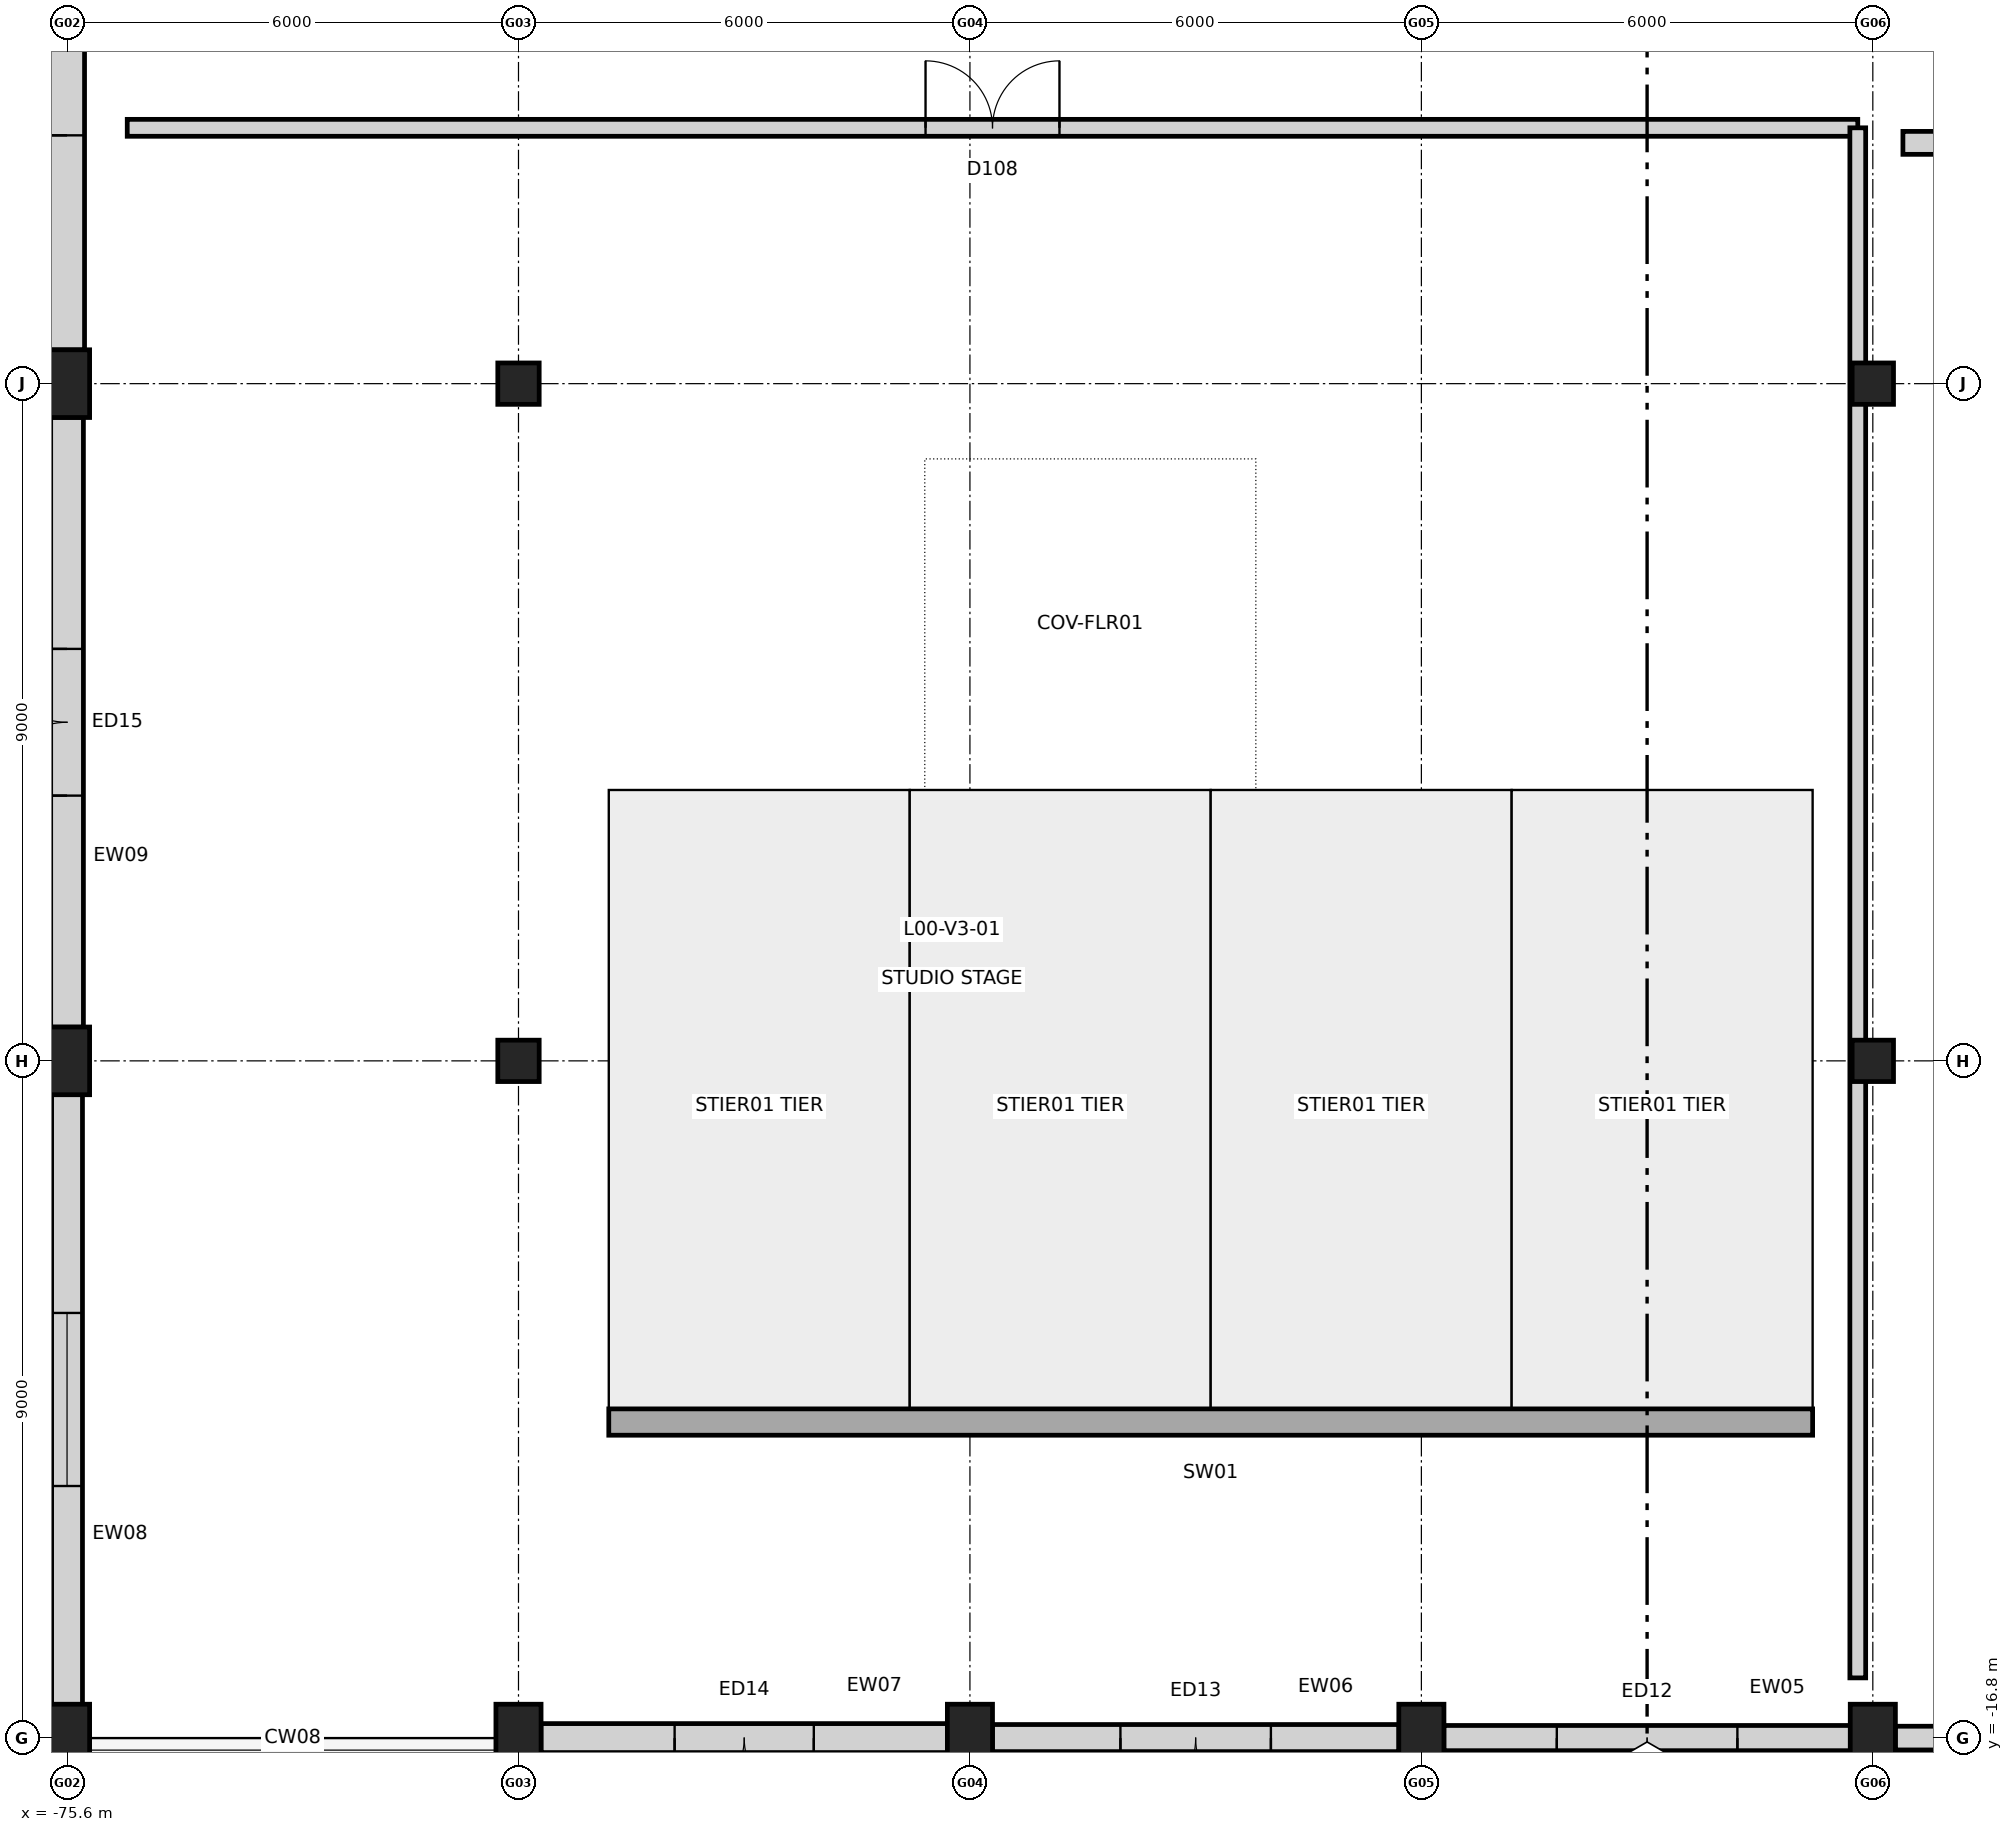
"""IFC4 building model, lengths in metres.
Left out: names, types, materials, properties, quantities, classifications, styles, units other than length and angle.
Written with IfcOpenShell. Run it as: python <this file> out.ifc"""

import sys

from ifc_helpers import new_model, si_unit, direction, frame, frame_2d, origin, origin_2d, place, context, subcontext, project, spatial, rectangle, extrude, element, fill, save


model = new_model("IFC4")
c1 = context("Model", 3, precision=1e-05, world=origin(), true_north=direction((0.0, 1.0)))
c2 = subcontext(c1, "Body", "Model", "MODEL_VIEW")
j1 = project(units=[si_unit("LENGTHUNIT", "METRE"), si_unit("PLANEANGLEUNIT", "RADIAN")], contexts=[c1])
p1 = place(None, origin())
s1 = spatial("IfcSite", under=j1, at=p1, CompositionType="ELEMENT")
p2 = place(p1, origin())
s2 = spatial("IfcBuilding", under=s1, at=p2, CompositionType="ELEMENT")
p3 = place(p2, origin())
s3 = spatial("IfcBuildingStorey", under=s2, at=p3, CompositionType="ELEMENT", Elevation=0.0)
for number, where, z_axis, x_axis in (
    (1, (-75.6, -16.8, 0.0), (0.0, 0.0, 1.0), (1.0, 0.0, 0.0)),
    (2, (-75.6, -7.8, 0.0), (0.0, 0.0, 1.0), (1.0, 0.0, 0.0)),
    (3, (-75.6, 1.2, 0.0), (0.0, 0.0, 1.0), (1.0, 0.0, 0.0)),
    (4, (-69.6, -16.8, 0.0), (0.0, 0.0, 1.0), (1.0, 0.0, 0.0)),
):
    element("IfcColumn", number, at=place(p3, frame(where, z_axis=z_axis, x_axis=x_axis)), inside=s3, PredefinedType="COLUMN", context=c2, shape_type="SweptSolid", body=[
        extrude(rectangle(XDim=0.6, YDim=0.9, at=origin_2d()), origin(), (0.0, 0.0, 1.0), 5.4),
    ])
for number, where, z_axis, x_axis in (
    (5, (-69.6, -7.8, 0.0), (0.0, 0.0, 1.0), (1.0, 0.0, 0.0)),
    (6, (-69.6, 1.2, 0.0), (0.0, 0.0, 1.0), (1.0, 0.0, 0.0)),
):
    element("IfcColumn", number, at=place(p3, frame(where, z_axis=z_axis, x_axis=x_axis)), inside=s3, PredefinedType="COLUMN", context=c2, shape_type="SweptSolid", body=[
        extrude(rectangle(XDim=0.55, YDim=0.55, at=origin_2d()), origin(), (0.0, 0.0, 1.0), 5.4),
    ])
for number, where, z_axis, x_axis in (
    (7, (-63.6, -16.8, 0.0), (0.0, 0.0, 1.0), (1.0, 0.0, 0.0)),
    (8, (-57.6, -16.8, 0.0), (0.0, 0.0, 1.0), (1.0, 0.0, 0.0)),
    (9, (-51.6, -16.8, 0.0), (0.0, 0.0, 1.0), (1.0, 0.0, 0.0)),
):
    element("IfcColumn", number, at=place(p3, frame(where, z_axis=z_axis, x_axis=x_axis)), inside=s3, PredefinedType="COLUMN", context=c2, shape_type="SweptSolid", body=[
        extrude(rectangle(XDim=0.6, YDim=0.9, at=origin_2d()), origin(), (0.0, 0.0, 1.0), 5.4),
    ])
for number, where, z_axis, x_axis in (
    (10, (-51.6, -7.8, 0.0), (0.0, 0.0, 1.0), (1.0, 0.0, 0.0)),
    (11, (-51.6, 1.2, 0.0), (0.0, 0.0, 1.0), (1.0, 0.0, 0.0)),
):
    element("IfcColumn", number, at=place(p3, frame(where, z_axis=z_axis, x_axis=x_axis)), inside=s3, PredefinedType="COLUMN", context=c2, shape_type="SweptSolid", body=[
        extrude(rectangle(XDim=0.55, YDim=0.55, at=origin_2d()), origin(), (0.0, 0.0, 1.0), 5.4),
    ])
p4 = place(p3, frame((-68.4, -12.6, 0.0), z_axis=(0.0, 0.0, 1.0), x_axis=(1.0, 0.0, 0.0)))
e12 = element("IfcWall", 12, at=p4, inside=s3, PredefinedType="SHEAR", context=c2, shape_type="SweptSolid", body=[
    extrude(rectangle(XDim=16.0, YDim=0.35, at=frame_2d((8.0, 0.0))), origin(), (0.0, 0.0, 1.0), 1.66),
])
p5 = place(p3, frame((-45.898, -16.8, 0.0), z_axis=(0.0, 0.0, 1.0), x_axis=(-1.0, 0.0, 0.0)))
e13 = element("IfcWall", 13, at=p5, inside=s3, PredefinedType="STANDARD", context=c2, shape_type="SweptSolid", body=[
    extrude(rectangle(XDim=5.404, YDim=0.315, at=frame_2d((2.702, 0.0))), origin(), (0.0, 0.0, 1.0), 4.32),
])
p6 = place(p5, frame((1.727, 0.0, 0.0)))
e14 = element("IfcOpeningElement", 14, at=p6, cuts=e13, PredefinedType="OPENING", context=c2, shape_type="SweptSolid", body=[
    extrude(rectangle(XDim=1.95, YDim=2.35, at=frame_2d((0.975, 1.175))), frame((0.0, 0.167, 0.0), z_axis=(0.0, -1.0, 0.0), x_axis=(1.0, 0.0, 0.0)), (0.0, 0.0, 1.0), 0.335),
])
p7 = place(p3, frame((-51.898, -16.8, 0.0), z_axis=(0.0, 0.0, 1.0), x_axis=(-1.0, 0.0, 0.0)))
e15 = element("IfcWall", 15, at=p7, inside=s3, PredefinedType="STANDARD", context=c2, shape_type="SweptSolid", body=[
    extrude(rectangle(XDim=5.404, YDim=0.335, at=frame_2d((2.702, 0.0))), origin(), (0.0, 0.0, 1.0), 4.32),
])
p8 = place(p7, frame((1.502, 0.0, 0.0)))
e16 = element("IfcOpeningElement", 16, at=p8, cuts=e15, PredefinedType="OPENING", context=c2, shape_type="SweptSolid", body=[
    extrude(rectangle(XDim=2.4, YDim=2.5, at=frame_2d((1.2, 1.25))), frame((0.0, 0.177, 0.0), z_axis=(0.0, -1.0, 0.0), x_axis=(1.0, 0.0, 0.0)), (0.0, 0.0, 1.0), 0.355),
])
p9 = place(p3, frame((-57.898, -16.8, 0.0), z_axis=(0.0, 0.0, 1.0), x_axis=(-1.0, 0.0, 0.0)))
e17 = element("IfcWall", 17, at=p9, inside=s3, PredefinedType="STANDARD", context=c2, shape_type="SweptSolid", body=[
    extrude(rectangle(XDim=5.404, YDim=0.36, at=frame_2d((2.702, 0.0))), origin(), (0.0, 0.0, 1.0), 4.32),
])
p10 = place(p9, frame((1.702, 0.0, 0.0)))
e18 = element("IfcOpeningElement", 18, at=p10, cuts=e17, PredefinedType="OPENING", context=c2, shape_type="SweptSolid", body=[
    extrude(rectangle(XDim=2.0, YDim=2.4, at=frame_2d((1.0, 1.2))), frame((0.0, 0.19, 0.0), z_axis=(0.0, -1.0, 0.0), x_axis=(1.0, 0.0, 0.0)), (0.0, 0.0, 1.0), 0.38),
])
p11 = place(p3, frame((-63.898, -16.8, 0.0), z_axis=(0.0, 0.0, 1.0), x_axis=(-1.0, 0.0, 0.0)))
e19 = element("IfcWall", 19, at=p11, inside=s3, PredefinedType="STANDARD", context=c2, shape_type="SweptSolid", body=[
    extrude(rectangle(XDim=5.404, YDim=0.385, at=frame_2d((2.702, 0.0))), origin(), (0.0, 0.0, 1.0), 4.32),
])
p12 = place(p11, frame((1.777, 0.0, 0.0)))
e20 = element("IfcOpeningElement", 20, at=p12, cuts=e19, PredefinedType="OPENING", context=c2, shape_type="SweptSolid", body=[
    extrude(rectangle(XDim=1.85, YDim=2.25, at=frame_2d((0.925, 1.125))), frame((0.0, 0.202, 0.0), z_axis=(0.0, -1.0, 0.0), x_axis=(1.0, 0.0, 0.0)), (0.0, 0.0, 1.0), 0.405),
])
p13 = place(p3, frame((-75.6, -16.352, 0.0), z_axis=(0.0, 0.0, 1.0), x_axis=(0.0, 1.0, 0.0)))
e21 = element("IfcWall", 21, at=p13, inside=s3, PredefinedType="STANDARD", context=c2, shape_type="SweptSolid", body=[
    extrude(rectangle(XDim=8.104, YDim=0.41, at=frame_2d((4.052, 0.0))), origin(), (0.0, 0.0, 1.0), 4.404),
])
p14 = place(p13, frame((2.902, 0.0, 0.85)))
e22 = element("IfcOpeningElement", 22, at=p14, cuts=e21, PredefinedType="OPENING", context=c2, shape_type="SweptSolid", body=[
    extrude(rectangle(XDim=2.3, YDim=1.85, at=frame_2d((1.15, 0.925))), frame((0.0, 0.215, 0.0), z_axis=(0.0, -1.0, 0.0), x_axis=(1.0, 0.0, 0.0)), (0.0, 0.0, 1.0), 0.43),
])
p15 = place(p3, frame((-75.6, -7.352, 0.0), z_axis=(0.0, 0.0, 1.0), x_axis=(0.0, 1.0, 0.0)))
e23 = element("IfcWall", 23, at=p15, inside=s3, PredefinedType="STANDARD", context=c2, shape_type="SweptSolid", body=[
    extrude(rectangle(XDim=8.104, YDim=0.435, at=frame_2d((4.052, 0.0))), origin(), (0.0, 0.0, 1.0), 4.404),
])
p16 = place(p15, frame((3.077, 0.0, 0.0)))
e24 = element("IfcOpeningElement", 24, at=p16, cuts=e23, PredefinedType="OPENING", context=c2, shape_type="SweptSolid", body=[
    extrude(rectangle(XDim=1.95, YDim=2.35, at=frame_2d((0.975, 1.175))), frame((0.0, 0.228, 0.0), z_axis=(0.0, -1.0, 0.0), x_axis=(1.0, 0.0, 0.0)), (0.0, 0.0, 1.0), 0.455),
])
p17 = place(p3, frame((-75.6, 1.648, 0.0), z_axis=(0.0, 0.0, 1.0), x_axis=(0.0, 1.0, 0.0)))
e25 = element("IfcWall", 25, at=p17, inside=s3, PredefinedType="STANDARD", context=c2, shape_type="SweptSolid", body=[
    extrude(rectangle(XDim=8.104, YDim=0.465, at=frame_2d((4.052, 0.0))), origin(), (0.0, 0.0, 1.0), 4.404),
])
p18 = place(p17, frame((2.852, 0.0, 0.0)))
e26 = element("IfcOpeningElement", 26, at=p18, cuts=e25, PredefinedType="OPENING", context=c2, shape_type="SweptSolid", body=[
    extrude(rectangle(XDim=2.4, YDim=2.5, at=frame_2d((1.2, 1.25))), frame((0.0, 0.242, 0.0), z_axis=(0.0, -1.0, 0.0), x_axis=(1.0, 0.0, 0.0)), (0.0, 0.0, 1.0), 0.485),
])
p19 = place(p3, frame((-74.8, 4.6, 0.0), z_axis=(0.0, 0.0, 1.0), x_axis=(1.0, 0.0, 0.0)))
e27 = element("IfcWall", 27, at=p19, inside=s3, PredefinedType="PARTITIONING", context=c2, shape_type="SweptSolid", body=[
    extrude(rectangle(XDim=23.0, YDim=0.225, at=frame_2d((11.5, 0.0))), origin(), (0.0, 0.0, 1.0), 5.02),
])
p20 = place(p19, frame((10.61, 0.0, 0.0)))
e28 = element("IfcOpeningElement", 28, at=p20, cuts=e27, PredefinedType="OPENING", context=c2, shape_type="SweptSolid", body=[
    extrude(rectangle(XDim=1.78, YDim=2.3, at=frame_2d((0.89, 1.15))), frame((0.0, 0.123, 0.0), z_axis=(0.0, -1.0, 0.0), x_axis=(1.0, 0.0, 0.0)), (0.0, 0.0, 1.0), 0.245),
])
p21 = place(p3, frame((-51.8, -16.0, 0.0), z_axis=(0.0, 0.0, 1.0), x_axis=(0.0, 1.0, 0.0)))
e29 = element("IfcWall", 29, at=p21, inside=s3, PredefinedType="PARTITIONING", context=c2, shape_type="SweptSolid", body=[
    extrude(rectangle(XDim=20.6, YDim=0.21, at=frame_2d((10.3, 0.0))), origin(), (0.0, 0.0, 1.0), 4.165),
])
p22 = place(p3, frame((-51.2, 4.4, 0.0), z_axis=(0.0, 0.0, 1.0), x_axis=(1.0, 0.0, 0.0)))
e30 = element("IfcWall", 30, at=p22, inside=s3, PredefinedType="PARTITIONING", context=c2, shape_type="SweptSolid", body=[
    extrude(rectangle(XDim=6.65, YDim=0.305, at=frame_2d((3.325, 0.0))), origin(), (0.0, 0.0, 1.0), 5.02),
])
p23 = place(p22, frame((2.365, 0.0, 0.0)))
e31 = element("IfcOpeningElement", 31, at=p23, cuts=e30, PredefinedType="OPENING", context=c2, shape_type="SweptSolid", body=[
    extrude(rectangle(XDim=1.92, YDim=2.4, at=frame_2d((0.96, 1.2))), frame((0.0, 0.162, 0.0), z_axis=(0.0, -1.0, 0.0), x_axis=(1.0, 0.0, 0.0)), (0.0, 0.0, 1.0), 0.325),
])
p24 = place(p8, origin())
e32 = element("IfcDoor", 32, at=p24, inside=s3, OperationType="DOUBLE_DOOR_SINGLE_SWING", PredefinedType="DOOR", context=c2, shape_type="SweptSolid", body=[
    extrude(rectangle(XDim=2.4, YDim=2.5, at=frame_2d((1.2, 1.25))), frame((0.0, 0.025, 0.0), z_axis=(0.0, -1.0, 0.0), x_axis=(1.0, 0.0, 0.0)), (0.0, 0.0, 1.0), 0.05),
])
fill(e16, e32)
p25 = place(p10, origin())
e33 = element("IfcDoor", 33, at=p25, inside=s3, OperationType="DOUBLE_DOOR_SINGLE_SWING", PredefinedType="DOOR", context=c2, shape_type="SweptSolid", body=[
    extrude(rectangle(XDim=2.0, YDim=2.4, at=frame_2d((1.0, 1.2))), frame((0.0, 0.025, 0.0), z_axis=(0.0, -1.0, 0.0), x_axis=(1.0, 0.0, 0.0)), (0.0, 0.0, 1.0), 0.05),
])
fill(e18, e33)
p26 = place(p12, origin())
e34 = element("IfcDoor", 34, at=p26, inside=s3, OperationType="DOUBLE_DOOR_SINGLE_SWING", PredefinedType="DOOR", context=c2, shape_type="SweptSolid", body=[
    extrude(rectangle(XDim=1.85, YDim=2.25, at=frame_2d((0.925, 1.125))), frame((0.0, 0.025, 0.0), z_axis=(0.0, -1.0, 0.0), x_axis=(1.0, 0.0, 0.0)), (0.0, 0.0, 1.0), 0.05),
])
fill(e20, e34)
p27 = place(p14, origin())
e35 = element("IfcWindow", 35, at=p27, inside=s3, PartitioningType="SINGLE_PANEL", PredefinedType="WINDOW", context=c2, shape_type="SweptSolid", body=[
    extrude(rectangle(XDim=2.3, YDim=1.85, at=frame_2d((1.15, 0.925))), frame((0.0, 0.03, 0.0), z_axis=(0.0, -1.0, 0.0), x_axis=(1.0, 0.0, 0.0)), (0.0, 0.0, 1.0), 0.06),
])
fill(e22, e35)
p28 = place(p16, origin())
e36 = element("IfcDoor", 36, at=p28, inside=s3, OperationType="DOUBLE_DOOR_SINGLE_SWING", PredefinedType="DOOR", context=c2, shape_type="SweptSolid", body=[
    extrude(rectangle(XDim=1.95, YDim=2.35, at=frame_2d((0.975, 1.175))), frame((0.0, 0.025, 0.0), z_axis=(0.0, -1.0, 0.0), x_axis=(1.0, 0.0, 0.0)), (0.0, 0.0, 1.0), 0.05),
])
fill(e24, e36)
p29 = place(p18, origin())
e37 = element("IfcDoor", 37, at=p29, inside=s3, OperationType="DOUBLE_DOOR_SINGLE_SWING", PredefinedType="DOOR", context=c2, shape_type="SweptSolid", body=[
    extrude(rectangle(XDim=2.4, YDim=2.5, at=frame_2d((1.2, 1.25))), frame((0.0, 0.025, 0.0), z_axis=(0.0, -1.0, 0.0), x_axis=(1.0, 0.0, 0.0)), (0.0, 0.0, 1.0), 0.05),
])
fill(e26, e37)
p30 = place(p20, origin())
e38 = element("IfcDoor", 38, at=p30, inside=s3, OperationType="DOUBLE_DOOR_SINGLE_SWING", PredefinedType="DOOR", context=c2, shape_type="SweptSolid", body=[
    extrude(rectangle(XDim=1.78, YDim=2.3, at=frame_2d((0.89, 1.15))), frame((0.0, 0.025, 0.0), z_axis=(0.0, -1.0, 0.0), x_axis=(1.0, 0.0, 0.0)), (0.0, 0.0, 1.0), 0.05),
])
fill(e28, e38)
save(model, sys.argv[1])
